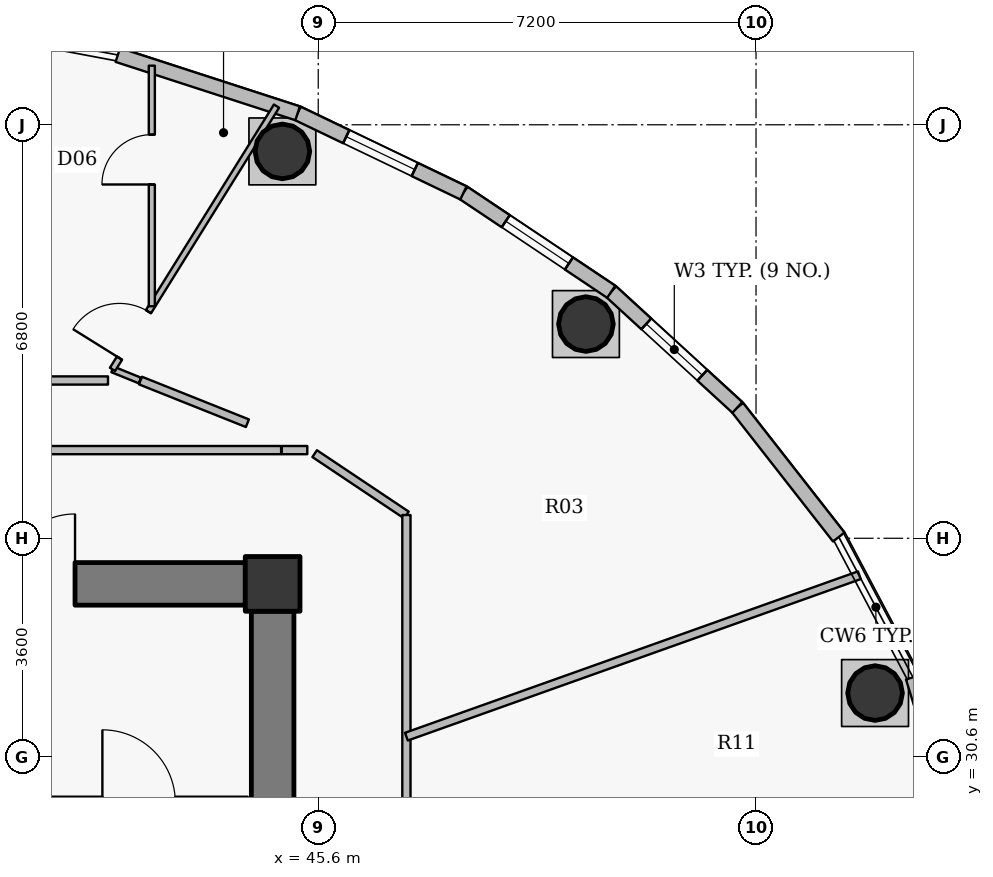
"""IFC4 building model, lengths in metres.
Left out: names, types, materials, properties, quantities, classifications, styles, units other than length and angle.
Written with IfcOpenShell. Run it as: python <this file> out.ifc"""

import sys

from ifc_helpers import new_model, si_unit, direction, frame, frame_2d, origin, origin_2d, place, context, subcontext, project, spatial, rectangle, hollow_circle, extrude, source, transform, mapped, element, fill, save


model = new_model("IFC4")
c1 = context("Model", 3, precision=1e-05, world=origin(), true_north=direction((0.0, 1.0)))
c2 = subcontext(c1, "Body", "Model", "MODEL_VIEW")
j1 = project(units=[si_unit("LENGTHUNIT", "METRE"), si_unit("PLANEANGLEUNIT", "RADIAN")], contexts=[c1])
p1 = place(None, origin())
s1 = spatial("IfcSite", under=j1, at=p1, CompositionType="ELEMENT")
p2 = place(p1, origin())
s2 = spatial("IfcBuilding", under=s1, at=p2, CompositionType="ELEMENT")
p3 = place(p2, frame((0.0, 0.0, 359.4)))
s3 = spatial("IfcBuildingStorey", under=s2, at=p3, CompositionType="ELEMENT", Elevation=359.4)
p4 = place(p3, frame((44.85, 33.45, 0.0), z_axis=(0.0, 0.0, 1.0), x_axis=(1.0, 0.0, 0.0)))
e1 = element("IfcColumn", 1, at=p4, inside=s3, PredefinedType="COLUMN", context=c2, shape_type="SweptSolid", body=[
    extrude(rectangle(XDim=0.9, YDim=0.9, at=origin_2d()), origin(), (0.0, 0.0, 1.0), 4.2),
])
p5 = place(p3, frame((27.6, 33.45, 0.0), z_axis=(0.0, 0.0, 1.0), x_axis=(1.0, 0.0, 0.0)))
e2 = element("IfcWall", 2, at=p5, inside=s3, PredefinedType="SHEAR", context=c2, shape_type="SweptSolid", body=[
    extrude(rectangle(XDim=16.8, YDim=0.7, at=frame_2d((8.4, 0.0))), origin(), (0.0, 0.0, 1.0), 3.45),
])
p6 = place(p5, frame((12.85, 0.0, 0.0)))
e3 = element("IfcOpeningElement", 3, at=p6, cuts=e2, PredefinedType="OPENING", context=c2, shape_type="SweptSolid", body=[
    extrude(rectangle(XDim=1.15, YDim=2.15, at=origin_2d()), frame((0.575, 0.36, 1.075), z_axis=(0.0, -1.0, 0.0), x_axis=(1.0, 0.0, 0.0)), (0.0, 0.0, 1.0), 0.72),
])
p7 = place(p3, frame((44.85, 33.0, 0.0), z_axis=(0.0, 0.0, 1.0), x_axis=(0.0, -1.0, 0.0)))
e4 = element("IfcWall", 4, at=p7, inside=s3, PredefinedType="SHEAR", context=c2, shape_type="SweptSolid", body=[
    extrude(rectangle(XDim=12.0, YDim=0.7, at=frame_2d((6.0, 0.0))), origin(), (0.0, 0.0, 1.0), 3.45),
])
for number, where, z_axis, x_axis in (
    (5, (54.758, 31.655, 0.0), (0.0, 0.0, 1.0), (1.0, 0.0, 0.0)),
    (6, (50.002, 37.723, 0.0), (0.0, 0.0, 1.0), (1.0, 0.0, 0.0)),
    (7, (45.01, 40.562, 0.0), (0.0, 0.0, 1.0), (1.0, 0.0, 0.0)),
):
    element("IfcColumn", number, at=place(p3, frame(where, z_axis=z_axis, x_axis=x_axis)), inside=s3, PredefinedType="COLUMN", context=c2, shape_type="SweptSolid", body=[
        extrude(hollow_circle(Radius=0.45, WallThickness=0.028, at=origin_2d()), origin(), (0.0, 0.0, 1.0), 3.9),
    ])
p8 = place(p3, frame((55.381, 31.913, 0.0), z_axis=(0.0, 0.0, 1.0), x_axis=(0.293105547213, -0.956080089842, 0.0)))
e8 = element("IfcWall", 8, at=p8, inside=s3, PredefinedType="SOLIDWALL", context=c2, shape_type="SweptSolid", body=[
    extrude(rectangle(XDim=2.538, YDim=0.24, at=frame_2d((1.269, 0.0))), origin(), (0.0, 0.0, 1.0), 3.9),
])
p9 = place(p3, frame((52.493, 36.352, 0.0), z_axis=(0.0, 0.0, 1.0), x_axis=(0.616286367698, -0.78752213492, 0.0)))
e9 = element("IfcWall", 9, at=p9, inside=s3, PredefinedType="SOLIDWALL", context=c2, shape_type="SweptSolid", body=[
    extrude(rectangle(XDim=2.706, YDim=0.24, at=frame_2d((1.353, 0.0))), origin(), (0.0, 0.0, 1.0), 3.9),
])
p10 = place(p3, frame((50.419, 38.254, 0.0), z_axis=(0.0, 0.0, 1.0), x_axis=(0.737020907932, -0.675869944051, 0.0)))
e10 = element("IfcWall", 10, at=p10, inside=s3, PredefinedType="SOLIDWALL", context=c2, shape_type="SweptSolid", body=[
    extrude(rectangle(XDim=2.815, YDim=0.24, at=frame_2d((1.407, 0.0))), origin(), (0.0, 0.0, 1.0), 3.9),
])
p11 = place(p10, frame((0.782, 0.0, 0.9)))
e11 = element("IfcOpeningElement", 11, at=p11, cuts=e10, PredefinedType="OPENING", context=c2, shape_type="SweptSolid", body=[
    extrude(rectangle(XDim=1.25, YDim=1.65, at=origin_2d()), frame((0.625, 0.13, 0.825), z_axis=(0.0, -1.0, 0.0), x_axis=(1.0, 0.0, 0.0)), (0.0, 0.0, 1.0), 0.26),
])
p12 = place(p3, frame((47.988, 39.88, 0.0), z_axis=(0.0, 0.0, 1.0), x_axis=(0.831201688654, -0.555970999944, 0.0)))
e12 = element("IfcWall", 12, at=p12, inside=s3, PredefinedType="SOLIDWALL", context=c2, shape_type="SweptSolid", body=[
    extrude(rectangle(XDim=2.925, YDim=0.24, at=frame_2d((1.462, 0.0))), origin(), (0.0, 0.0, 1.0), 3.9),
])
p13 = place(p12, frame((0.837, 0.0, 0.9)))
e13 = element("IfcOpeningElement", 13, at=p13, cuts=e12, PredefinedType="OPENING", context=c2, shape_type="SweptSolid", body=[
    extrude(rectangle(XDim=1.25, YDim=1.65, at=origin_2d()), frame((0.625, 0.13, 0.825), z_axis=(0.0, -1.0, 0.0), x_axis=(1.0, 0.0, 0.0)), (0.0, 0.0, 1.0), 0.26),
])
p14 = place(p3, frame((45.26, 41.189, 0.0), z_axis=(0.0, 0.0, 1.0), x_axis=(0.901557057889, -0.432660226241, 0.0)))
e14 = element("IfcWall", 14, at=p14, inside=s3, PredefinedType="SOLIDWALL", context=c2, shape_type="SweptSolid", body=[
    extrude(rectangle(XDim=3.025, YDim=0.24, at=frame_2d((1.513, 0.0))), origin(), (0.0, 0.0, 1.0), 3.9),
])
p15 = place(p14, frame((0.887, 0.0, 0.9)))
e15 = element("IfcOpeningElement", 15, at=p15, cuts=e14, PredefinedType="OPENING", context=c2, shape_type="SweptSolid", body=[
    extrude(rectangle(XDim=1.25, YDim=1.65, at=origin_2d()), frame((0.625, 0.13, 0.825), z_axis=(0.0, -1.0, 0.0), x_axis=(1.0, 0.0, 0.0)), (0.0, 0.0, 1.0), 0.26),
])
p16 = place(p3, frame((42.304, 42.148, 0.0), z_axis=(0.0, 0.0, 1.0), x_axis=(0.951212850731, -0.308535431682, 0.0)))
e16 = element("IfcWall", 16, at=p16, inside=s3, PredefinedType="SOLIDWALL", context=c2, shape_type="SweptSolid", body=[
    extrude(rectangle(XDim=3.108, YDim=0.24, at=frame_2d((1.554, 0.0))), origin(), (0.0, 0.0, 1.0), 3.9),
])
p17 = place(p3, frame((35.95, 29.85, 0.0), z_axis=(0.0, 0.0, 1.0), x_axis=(1.0, 0.0, 0.0)))
e17 = element("IfcWall", 17, at=p17, inside=s3, PredefinedType="PARTITIONING", context=c2, shape_type="SweptSolid", body=[
    extrude(rectangle(XDim=8.49, YDim=0.2, at=frame_2d((4.245, 0.0))), origin(), (0.0, 0.0, 1.0), 3.485),
])
p18 = place(p17, frame((6.1, 0.0, 0.0)))
e18 = element("IfcOpeningElement", 18, at=p18, cuts=e17, PredefinedType="OPENING", context=c2, shape_type="SweptSolid", body=[
    extrude(rectangle(XDim=1.2, YDim=2.15, at=origin_2d()), frame((0.6, 0.11, 1.075), z_axis=(0.0, -1.0, 0.0), x_axis=(1.0, 0.0, 0.0)), (0.0, 0.0, 1.0), 0.22),
])
p19 = place(p17, frame((0.37, 0.0, 0.0)))
e19 = element("IfcOpeningElement", 19, at=p19, cuts=e17, PredefinedType="OPENING", context=c2, shape_type="SweptSolid", body=[
    extrude(rectangle(XDim=1.15, YDim=2.15, at=origin_2d()), frame((0.575, 0.11, 1.075), z_axis=(0.0, -1.0, 0.0), x_axis=(1.0, 0.0, 0.0)), (0.0, 0.0, 1.0), 0.22),
])
p20 = place(p17, frame((2.425, 0.0, 0.0)))
e20 = element("IfcOpeningElement", 20, at=p20, cuts=e17, PredefinedType="OPENING", context=c2, shape_type="SweptSolid", body=[
    extrude(rectangle(XDim=1.05, YDim=2.15, at=origin_2d()), frame((0.525, 0.11, 1.075), z_axis=(0.0, -1.0, 0.0), x_axis=(1.0, 0.0, 0.0)), (0.0, 0.0, 1.0), 0.22),
])
p21 = place(p3, frame((42.216, 36.977, 0.0), z_axis=(0.0, 0.0, 1.0), x_axis=(0.926767657822, -0.375635073463, 0.0)))
e21 = element("IfcWall", 21, at=p21, inside=s3, PredefinedType="PARTITIONING", context=c2, shape_type="SweptSolid", body=[
    extrude(rectangle(XDim=0.486, YDim=0.1, at=frame_2d((0.243, 0.0))), origin(), (0.0, 0.0, 1.0), 2.685),
])
p22 = place(p3, frame((42.216, 36.977, 0.0), z_axis=(0.0, 0.0, 1.0), x_axis=(0.528823937776, 0.848731549334, 0.0)))
e22 = element("IfcWall", 22, at=p22, inside=s3, PredefinedType="PARTITIONING", context=c2, shape_type="SweptSolid", body=[
    extrude(rectangle(XDim=5.101, YDim=0.1, at=frame_2d((2.551, 0.0))), origin(), (0.0, 0.0, 1.0), 2.385),
])
p23 = place(p22, frame((0.218, 0.0, 0.0)))
e23 = element("IfcOpeningElement", 23, at=p23, cuts=e22, PredefinedType="OPENING", context=c2, shape_type="SweptSolid", body=[
    extrude(rectangle(XDim=0.9, YDim=2.1, at=origin_2d()), frame((0.45, 0.06, 1.05), z_axis=(0.0, -1.0, 0.0), x_axis=(1.0, 0.0, 0.0)), (0.0, 0.0, 1.0), 0.12),
])
p24 = place(p3, frame((42.863, 38.015, 0.0), z_axis=(0.0, 0.0, 1.0), x_axis=(0.0, 1.0, 0.0)))
e24 = element("IfcWall", 24, at=p24, inside=s3, PredefinedType="PARTITIONING", context=c2, shape_type="SweptSolid", body=[
    extrude(rectangle(XDim=3.957, YDim=0.1, at=frame_2d((1.979, 0.0))), origin(), (0.0, 0.0, 1.0), 2.385),
])
p25 = place(p24, frame((2.003, 0.0, 0.0)))
e25 = element("IfcOpeningElement", 25, at=p25, cuts=e24, PredefinedType="OPENING", context=c2, shape_type="SweptSolid", body=[
    extrude(rectangle(XDim=0.82, YDim=2.1, at=origin_2d()), frame((0.41, 0.06, 1.05), z_axis=(0.0, -1.0, 0.0), x_axis=(1.0, 0.0, 0.0)), (0.0, 0.0, 1.0), 0.12),
])
p26 = place(p3, frame((44.999, 35.65, 0.0), z_axis=(0.0, 0.0, 1.0), x_axis=(1.0, 0.0, 0.0)))
e26 = element("IfcWall", 26, at=p26, inside=s3, PredefinedType="PARTITIONING", context=c2, shape_type="SweptSolid", body=[
    extrude(rectangle(XDim=0.421, YDim=0.135, at=frame_2d((0.21, 0.0))), origin(), (0.0, 0.0, 1.0), 3.9),
])
p27 = place(p3, frame((45.541, 35.592, 0.0), z_axis=(0.0, 0.0, 1.0), x_axis=(0.831180227396, -0.556003084151, 0.0)))
e27 = element("IfcWall", 27, at=p27, inside=s3, PredefinedType="PARTITIONING", context=c2, shape_type="SweptSolid", body=[
    extrude(rectangle(XDim=1.815, YDim=0.135, at=frame_2d((0.908, 0.0))), origin(), (0.0, 0.0, 1.0), 2.685),
])
p28 = place(p3, frame((47.05, 19.417, 0.0), z_axis=(0.0, 0.0, 1.0), x_axis=(0.0, 1.0, 0.0)))
e28 = element("IfcWall", 28, at=p28, inside=s3, PredefinedType="PARTITIONING", context=c2, shape_type="SweptSolid", body=[
    extrude(rectangle(XDim=15.165, YDim=0.135, at=frame_2d((7.583, 0.0))), origin(), (0.0, 0.0, 1.0), 2.685),
])
p29 = place(p3, frame((47.05, 30.938, 0.0), z_axis=(0.0, 0.0, 1.0), x_axis=(0.94198404568, 0.335657649524, 0.0)))
e29 = element("IfcWall", 29, at=p29, inside=s3, PredefinedType="PARTITIONING", context=c2, shape_type="SweptSolid", body=[
    extrude(rectangle(XDim=7.908, YDim=0.135, at=frame_2d((3.954, 0.0))), origin(), (0.0, 0.0, 1.0), 2.385),
])
p30 = place(p3, frame((37.258, 35.65, 0.0), z_axis=(0.0, 0.0, 1.0), x_axis=(1.0, 0.0, 0.0)))
e30 = element("IfcWall", 30, at=p30, inside=s3, PredefinedType="PARTITIONING", context=c2, shape_type="SweptSolid", body=[
    extrude(rectangle(XDim=7.732, YDim=0.135, at=frame_2d((3.866, 0.0))), origin(), (0.0, 0.0, 1.0), 2.685),
])
p31 = place(p3, frame((45.2, 33.8, 0.0), z_axis=(0.0, 0.0, 1.0), x_axis=(-1.0, 0.0, 0.0)))
e31 = element("IfcWall", 31, at=p31, inside=s3, PredefinedType="PARTITIONING", context=c2, shape_type="SweptSolid", body=[
    extrude(rectangle(XDim=0.79, YDim=0.135, at=frame_2d((0.395, 0.0))), origin(), (0.0, 0.0, 1.0), 2.685),
])
p32 = place(p3, frame((45.2, 33.01, 0.0), z_axis=(0.0, 0.0, 1.0), x_axis=(0.0, 1.0, 0.0)))
e32 = element("IfcWall", 32, at=p32, inside=s3, PredefinedType="PARTITIONING", context=c2, shape_type="SweptSolid", body=[
    extrude(rectangle(XDim=0.482, YDim=0.135, at=frame_2d((0.241, 0.0))), origin(), (0.0, 0.0, 1.0), 3.9),
])
p33 = place(p3, frame((42.142, 36.795, 0.0), z_axis=(0.0, 0.0, 1.0), x_axis=(-1.0, 0.0, 0.0)))
e33 = element("IfcWall", 33, at=p33, inside=s3, PredefinedType="PARTITIONING", context=c2, shape_type="SweptSolid", body=[
    extrude(rectangle(XDim=4.865, YDim=0.135, at=frame_2d((2.432, 0.0))), origin(), (0.0, 0.0, 1.0), 2.685),
])
p34 = place(p3, frame((44.435, 36.092, 0.0), z_axis=(0.0, 0.0, 1.0), x_axis=(-0.928778774969, 0.370634573627, 0.0)))
e34 = element("IfcWall", 34, at=p34, inside=s3, PredefinedType="PARTITIONING", context=c2, shape_type="SweptSolid", body=[
    extrude(rectangle(XDim=1.893, YDim=0.135, at=frame_2d((0.947, 0.0))), origin(), (0.0, 0.0, 1.0), 2.685),
])
m1 = source(origin(), c2, "Body", "SweptSolid", [
    extrude(rectangle(XDim=1.25, YDim=1.65, at=origin_2d()), frame((0.625, 0.03, 0.825), z_axis=(0.0, -1.0, 0.0), x_axis=(1.0, 0.0, 0.0)), (0.0, 0.0, 1.0), 0.06),
])
p35 = place(p11, origin())
e35 = element("IfcWindow", 35, at=p35, inside=s3, PartitioningType="SINGLE_PANEL", PredefinedType="WINDOW", context=c2, shape_type="MappedRepresentation", body=[
    mapped(m1, transform((0.0, 0.0, 0.0), x_axis=(1.0, 0.0, 0.0), y_axis=(0.0, 1.0, 0.0), z_axis=(0.0, 0.0, 1.0), scale=1.0)),
])
fill(e11, e35)
p36 = place(p13, origin())
e36 = element("IfcWindow", 36, at=p36, inside=s3, PartitioningType="SINGLE_PANEL", PredefinedType="WINDOW", context=c2, shape_type="MappedRepresentation", body=[
    mapped(m1, transform((0.0, 0.0, 0.0), x_axis=(1.0, 0.0, 0.0), y_axis=(0.0, 1.0, 0.0), z_axis=(0.0, 0.0, 1.0), scale=1.0)),
])
fill(e13, e36)
p37 = place(p15, origin())
e37 = element("IfcWindow", 37, at=p37, inside=s3, PartitioningType="SINGLE_PANEL", PredefinedType="WINDOW", context=c2, shape_type="MappedRepresentation", body=[
    mapped(m1, transform((0.0, 0.0, 0.0), x_axis=(1.0, 0.0, 0.0), y_axis=(0.0, 1.0, 0.0), z_axis=(0.0, 0.0, 1.0), scale=1.0)),
])
fill(e15, e37)
m2 = source(origin(), c2, "Body", "SweptSolid", [
    extrude(rectangle(XDim=1.15, YDim=2.15, at=origin_2d()), frame((0.575, 0.025, 1.075), z_axis=(0.0, -1.0, 0.0), x_axis=(1.0, 0.0, 0.0)), (0.0, 0.0, 1.0), 0.05),
])
p38 = place(p6, origin())
e38 = element("IfcDoor", 38, at=p38, inside=s3, OperationType="SINGLE_SWING_RIGHT", PredefinedType="DOOR", context=c2, shape_type="MappedRepresentation", body=[
    mapped(m2, transform((0.0, 0.0, 0.0), x_axis=(1.0, 0.0, 0.0), y_axis=(0.0, 1.0, 0.0), z_axis=(0.0, 0.0, 1.0), scale=1.0)),
])
fill(e3, e38)
m3 = source(origin(), c2, "Body", "SweptSolid", [
    extrude(rectangle(XDim=0.9, YDim=2.1, at=origin_2d()), frame((0.45, 0.025, 1.05), z_axis=(0.0, -1.0, 0.0), x_axis=(1.0, 0.0, 0.0)), (0.0, 0.0, 1.0), 0.05),
])
p39 = place(p23, origin())
e39 = element("IfcDoor", 39, at=p39, inside=s3, OperationType="SINGLE_SWING_LEFT", PredefinedType="DOOR", context=c2, shape_type="MappedRepresentation", body=[
    mapped(m3, transform((0.0, 0.0, 0.0), x_axis=(1.0, 0.0, 0.0), y_axis=(0.0, 1.0, 0.0), z_axis=(0.0, 0.0, 1.0), scale=1.0)),
])
fill(e23, e39)
m4 = source(origin(), c2, "Body", "SweptSolid", [
    extrude(rectangle(XDim=0.82, YDim=2.1, at=origin_2d()), frame((0.41, 0.025, 1.05), z_axis=(0.0, -1.0, 0.0), x_axis=(1.0, 0.0, 0.0)), (0.0, 0.0, 1.0), 0.05),
])
p40 = place(p25, origin())
e40 = element("IfcDoor", 40, at=p40, inside=s3, OperationType="SINGLE_SWING_LEFT", PredefinedType="DOOR", context=c2, shape_type="MappedRepresentation", body=[
    mapped(m4, transform((0.0, 0.0, 0.0), x_axis=(1.0, 0.0, 0.0), y_axis=(0.0, 1.0, 0.0), z_axis=(0.0, 0.0, 1.0), scale=1.0)),
])
fill(e25, e40)
save(model, sys.argv[1])
